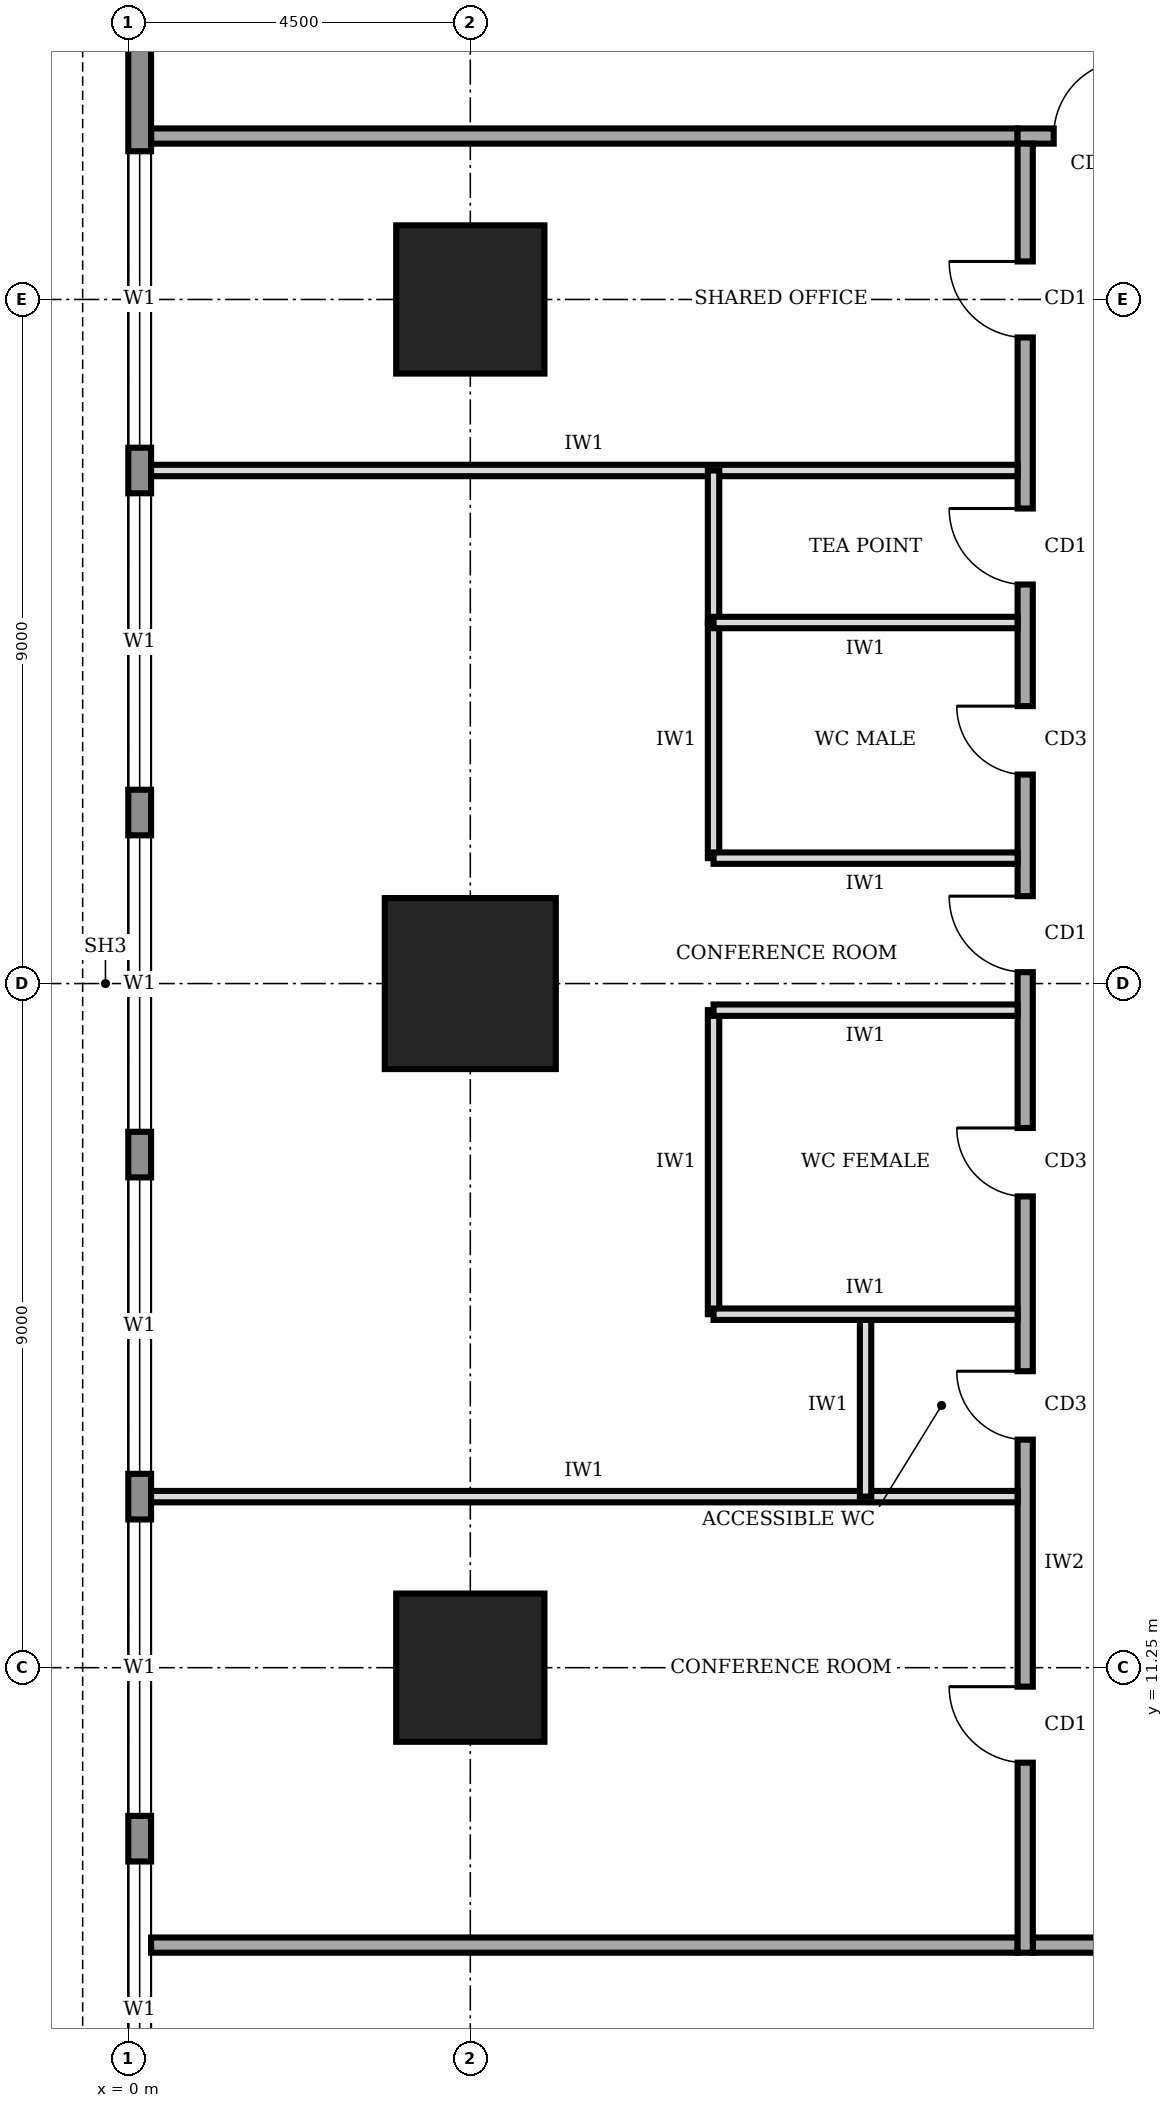
"""IFC4 building model, lengths in metres.
Left out: names, types, materials, properties, quantities, classifications, styles, units other than length and angle.
Written with IfcOpenShell. Run it as: python <this file> out.ifc"""

import sys

from ifc_helpers import new_model, si_unit, direction, frame, frame_2d, origin, origin_2d, place, context, subcontext, project, spatial, rectangle, extrude, element, fill, save


model = new_model("IFC4")
c1 = context("Model", 3, precision=1e-05, world=origin(), true_north=direction((0.0, 1.0)))
c2 = subcontext(c1, "Body", "Model", "MODEL_VIEW")
j1 = project(units=[si_unit("LENGTHUNIT", "METRE"), si_unit("PLANEANGLEUNIT", "RADIAN")], contexts=[c1])
p1 = place(None, origin())
s1 = spatial("IfcSite", under=j1, at=p1, CompositionType="ELEMENT")
p2 = place(p1, origin())
s2 = spatial("IfcBuilding", under=s1, at=p2, CompositionType="ELEMENT")
p3 = place(p2, frame((0.0, 0.0, 209.0)))
s3 = spatial("IfcBuildingStorey", under=s2, at=p3, CompositionType="ELEMENT", Elevation=209.0)
p4 = place(p3, frame((4.5, 11.25, 0.0), z_axis=(0.0, 0.0, 1.0), x_axis=(1.0, 0.0, 0.0)))
e1 = element("IfcColumn", 1, at=p4, inside=s3, PredefinedType="COLUMN", context=c2, shape_type="SweptSolid", body=[
    extrude(rectangle(XDim=1.95, YDim=1.95, at=origin_2d()), origin(), (0.0, 0.0, 1.0), 4.0),
])
p5 = place(p3, frame((4.5, 20.25, 0.0), z_axis=(0.0, 0.0, 1.0), x_axis=(1.0, 0.0, 0.0)))
e2 = element("IfcColumn", 2, at=p5, inside=s3, PredefinedType="COLUMN", context=c2, shape_type="SweptSolid", body=[
    extrude(rectangle(XDim=2.25, YDim=2.25, at=origin_2d()), origin(), (0.0, 0.0, 1.0), 4.0),
])
p6 = place(p3, frame((4.5, 29.25, 0.0), z_axis=(0.0, 0.0, 1.0), x_axis=(1.0, 0.0, 0.0)))
e3 = element("IfcColumn", 3, at=p6, inside=s3, PredefinedType="COLUMN", context=c2, shape_type="SweptSolid", body=[
    extrude(rectangle(XDim=1.95, YDim=1.95, at=origin_2d()), origin(), (0.0, 0.0, 1.0), 4.0),
])
p7 = place(p3, frame((0.15, 35.98, 0.0), z_axis=(0.0, 0.0, 1.0), x_axis=(0.0, -1.0, 0.0)))
e4 = element("IfcWall", 4, at=p7, inside=s3, PredefinedType="STANDARD", context=c2, shape_type="SweptSolid", body=[
    extrude(rectangle(XDim=31.46, YDim=0.3, at=frame_2d((15.73, 0.0))), origin(), (0.0, 0.0, 1.0), 3.75),
])
p8 = place(p7, frame((27.28, 0.0, 0.9)))
e5 = element("IfcOpeningElement", 5, at=p8, cuts=e4, PredefinedType="OPENING", context=c2, shape_type="SweptSolid", body=[
    extrude(rectangle(XDim=3.9, YDim=2.2, at=frame_2d((1.95, 1.1))), frame((0.0, 0.16, 0.0), z_axis=(0.0, -1.0, 0.0), x_axis=(1.0, 0.0, 0.0)), (0.0, 0.0, 1.0), 0.32),
])
p9 = place(p7, frame((22.78, 0.0, 0.9)))
e6 = element("IfcOpeningElement", 6, at=p9, cuts=e4, PredefinedType="OPENING", context=c2, shape_type="SweptSolid", body=[
    extrude(rectangle(XDim=3.9, YDim=2.2, at=frame_2d((1.95, 1.1))), frame((0.0, 0.16, 0.0), z_axis=(0.0, -1.0, 0.0), x_axis=(1.0, 0.0, 0.0)), (0.0, 0.0, 1.0), 0.32),
])
p10 = place(p7, frame((18.28, 0.0, 0.9)))
e7 = element("IfcOpeningElement", 7, at=p10, cuts=e4, PredefinedType="OPENING", context=c2, shape_type="SweptSolid", body=[
    extrude(rectangle(XDim=3.9, YDim=2.2, at=frame_2d((1.95, 1.1))), frame((0.0, 0.16, 0.0), z_axis=(0.0, -1.0, 0.0), x_axis=(1.0, 0.0, 0.0)), (0.0, 0.0, 1.0), 0.32),
])
p11 = place(p7, frame((13.78, 0.0, 0.9)))
e8 = element("IfcOpeningElement", 8, at=p11, cuts=e4, PredefinedType="OPENING", context=c2, shape_type="SweptSolid", body=[
    extrude(rectangle(XDim=3.9, YDim=2.2, at=frame_2d((1.95, 1.1))), frame((0.0, 0.16, 0.0), z_axis=(0.0, -1.0, 0.0), x_axis=(1.0, 0.0, 0.0)), (0.0, 0.0, 1.0), 0.32),
])
p12 = place(p7, frame((9.28, 0.0, 0.9)))
e9 = element("IfcOpeningElement", 9, at=p12, cuts=e4, PredefinedType="OPENING", context=c2, shape_type="SweptSolid", body=[
    extrude(rectangle(XDim=3.9, YDim=2.2, at=frame_2d((1.95, 1.1))), frame((0.0, 0.16, 0.0), z_axis=(0.0, -1.0, 0.0), x_axis=(1.0, 0.0, 0.0)), (0.0, 0.0, 1.0), 0.32),
])
p13 = place(p7, frame((4.78, 0.0, 0.9)))
e10 = element("IfcOpeningElement", 10, at=p13, cuts=e4, PredefinedType="OPENING", context=c2, shape_type="SweptSolid", body=[
    extrude(rectangle(XDim=3.9, YDim=2.2, at=frame_2d((1.95, 1.1))), frame((0.0, 0.16, 0.0), z_axis=(0.0, -1.0, 0.0), x_axis=(1.0, 0.0, 0.0)), (0.0, 0.0, 1.0), 0.32),
])
p14 = place(p3, frame((11.9, 7.6, 0.0), z_axis=(0.0, 0.0, 1.0), x_axis=(1.0, 0.0, 0.0)))
e11 = element("IfcWall", 11, at=p14, inside=s3, PredefinedType="SOLIDWALL", context=c2, shape_type="SweptSolid", body=[
    extrude(rectangle(XDim=16.9, YDim=0.2, at=frame_2d((8.45, 0.0))), origin(), (0.0, 0.0, 1.0), 3.75),
])
p15 = place(p3, frame((28.6, 31.4, 0.0), z_axis=(0.0, 0.0, 1.0), x_axis=(-1.0, 0.0, 0.0)))
e12 = element("IfcWall", 12, at=p15, inside=s3, PredefinedType="SOLIDWALL", context=c2, shape_type="SweptSolid", body=[
    extrude(rectangle(XDim=16.9, YDim=0.2, at=frame_2d((8.45, 0.0))), origin(), (0.0, 0.0, 1.0), 3.75),
])
p16 = place(p15, frame((15.425, 0.0, 0.0)))
e13 = element("IfcOpeningElement", 13, at=p16, cuts=e12, PredefinedType="OPENING", context=c2, shape_type="SweptSolid", body=[
    extrude(rectangle(XDim=1.0, YDim=2.1, at=frame_2d((0.5, 1.05))), frame((0.0, 0.11, 0.0), z_axis=(0.0, -1.0, 0.0), x_axis=(1.0, 0.0, 0.0)), (0.0, 0.0, 1.0), 0.22),
])
p17 = place(p15, frame((12.35, 0.0, 0.0)))
e14 = element("IfcOpeningElement", 14, at=p17, cuts=e12, PredefinedType="OPENING", context=c2, shape_type="SweptSolid", body=[
    extrude(rectangle(XDim=1.0, YDim=2.1, at=frame_2d((0.5, 1.05))), frame((0.0, 0.11, 0.0), z_axis=(0.0, -1.0, 0.0), x_axis=(1.0, 0.0, 0.0)), (0.0, 0.0, 1.0), 0.22),
])
p18 = place(p15, frame((5.6, 0.0, 0.0)))
e15 = element("IfcOpeningElement", 15, at=p18, cuts=e12, PredefinedType="OPENING", context=c2, shape_type="SweptSolid", body=[
    extrude(rectangle(XDim=1.0, YDim=2.1, at=frame_2d((0.5, 1.05))), frame((0.0, 0.11, 0.0), z_axis=(0.0, -1.0, 0.0), x_axis=(1.0, 0.0, 0.0)), (0.0, 0.0, 1.0), 0.22),
])
p19 = place(p15, frame((0.275, 0.0, 0.0)))
e16 = element("IfcOpeningElement", 16, at=p19, cuts=e12, PredefinedType="OPENING", context=c2, shape_type="SweptSolid", body=[
    extrude(rectangle(XDim=1.0, YDim=2.1, at=frame_2d((0.5, 1.05))), frame((0.0, 0.11, 0.0), z_axis=(0.0, -1.0, 0.0), x_axis=(1.0, 0.0, 0.0)), (0.0, 0.0, 1.0), 0.22),
])
p20 = place(p3, frame((11.8, 31.3, 0.0), z_axis=(0.0, 0.0, 1.0), x_axis=(0.0, -1.0, 0.0)))
e17 = element("IfcWall", 17, at=p20, inside=s3, PredefinedType="SOLIDWALL", context=c2, shape_type="SweptSolid", body=[
    extrude(rectangle(XDim=23.8, YDim=0.2, at=frame_2d((11.9, 0.0))), origin(), (0.0, 0.0, 1.0), 3.75),
])
p21 = place(p20, frame((20.3, 0.0, 0.0)))
e18 = element("IfcOpeningElement", 18, at=p21, cuts=e17, PredefinedType="OPENING", context=c2, shape_type="SweptSolid", body=[
    extrude(rectangle(XDim=1.0, YDim=2.1, at=frame_2d((0.5, 1.05))), frame((0.0, 0.11, 0.0), z_axis=(0.0, -1.0, 0.0), x_axis=(1.0, 0.0, 0.0)), (0.0, 0.0, 1.0), 0.22),
])
p22 = place(p20, frame((16.15, 0.0, 0.0)))
e19 = element("IfcOpeningElement", 19, at=p22, cuts=e17, PredefinedType="OPENING", context=c2, shape_type="SweptSolid", body=[
    extrude(rectangle(XDim=0.9, YDim=2.1, at=frame_2d((0.45, 1.05))), frame((0.0, 0.11, 0.0), z_axis=(0.0, -1.0, 0.0), x_axis=(1.0, 0.0, 0.0)), (0.0, 0.0, 1.0), 0.22),
])
p23 = place(p20, frame((12.95, 0.0, 0.0)))
e20 = element("IfcOpeningElement", 20, at=p23, cuts=e17, PredefinedType="OPENING", context=c2, shape_type="SweptSolid", body=[
    extrude(rectangle(XDim=0.9, YDim=2.1, at=frame_2d((0.45, 1.05))), frame((0.0, 0.11, 0.0), z_axis=(0.0, -1.0, 0.0), x_axis=(1.0, 0.0, 0.0)), (0.0, 0.0, 1.0), 0.22),
])
p24 = place(p20, frame((7.4, 0.0, 0.0)))
e21 = element("IfcOpeningElement", 21, at=p24, cuts=e17, PredefinedType="OPENING", context=c2, shape_type="SweptSolid", body=[
    extrude(rectangle(XDim=0.9, YDim=2.1, at=frame_2d((0.45, 1.05))), frame((0.0, 0.11, 0.0), z_axis=(0.0, -1.0, 0.0), x_axis=(1.0, 0.0, 0.0)), (0.0, 0.0, 1.0), 0.22),
])
p25 = place(p20, frame((4.8, 0.0, 0.0)))
e22 = element("IfcOpeningElement", 22, at=p25, cuts=e17, PredefinedType="OPENING", context=c2, shape_type="SweptSolid", body=[
    extrude(rectangle(XDim=1.0, YDim=2.1, at=frame_2d((0.5, 1.05))), frame((0.0, 0.11, 0.0), z_axis=(0.0, -1.0, 0.0), x_axis=(1.0, 0.0, 0.0)), (0.0, 0.0, 1.0), 0.22),
])
p26 = place(p20, frame((9.9, 0.0, 0.0)))
e23 = element("IfcOpeningElement", 23, at=p26, cuts=e17, PredefinedType="OPENING", context=c2, shape_type="SweptSolid", body=[
    extrude(rectangle(XDim=1.0, YDim=2.1, at=frame_2d((0.5, 1.05))), frame((0.0, 0.11, 0.0), z_axis=(0.0, -1.0, 0.0), x_axis=(1.0, 0.0, 0.0)), (0.0, 0.0, 1.0), 0.22),
])
p27 = place(p20, frame((1.55, 0.0, 0.0)))
e24 = element("IfcOpeningElement", 24, at=p27, cuts=e17, PredefinedType="OPENING", context=c2, shape_type="SweptSolid", body=[
    extrude(rectangle(XDim=1.0, YDim=2.1, at=frame_2d((0.5, 1.05))), frame((0.0, 0.11, 0.0), z_axis=(0.0, -1.0, 0.0), x_axis=(1.0, 0.0, 0.0)), (0.0, 0.0, 1.0), 0.22),
])
for number, where, z_axis, x_axis in (
    (25, (0.3, 7.6, 0.0), (0.0, 0.0, 1.0), (1.0, 0.0, 0.0)),
    (26, (0.3, 31.4, 0.0), (0.0, 0.0, 1.0), (1.0, 0.0, 0.0)),
):
    element("IfcWall", number, at=place(p3, frame(where, z_axis=z_axis, x_axis=x_axis)), inside=s3, PredefinedType="SOLIDWALL", context=c2, shape_type="SweptSolid", body=[
        extrude(rectangle(XDim=11.4, YDim=0.2, at=frame_2d((5.7, 0.0))), origin(), (0.0, 0.0, 1.0), 3.75),
    ])
for number, where, z_axis, x_axis in (
    (27, (0.3, 13.5, 0.0), (0.0, 0.0, 1.0), (1.0, 0.0, 0.0)),
    (28, (0.3, 27.0, 0.0), (0.0, 0.0, 1.0), (1.0, 0.0, 0.0)),
):
    element("IfcWall", number, at=place(p3, frame(where, z_axis=z_axis, x_axis=x_axis)), inside=s3, PredefinedType="PARTITIONING", context=c2, shape_type="SweptSolid", body=[
        extrude(rectangle(XDim=11.4, YDim=0.15, at=frame_2d((5.7, 0.0))), origin(), (0.0, 0.0, 1.0), 3.75),
    ])
p28 = place(p3, frame((11.7, 15.9, 0.0), z_axis=(0.0, 0.0, 1.0), x_axis=(-1.0, 0.0, 0.0)))
e29 = element("IfcWall", 29, at=p28, inside=s3, PredefinedType="PARTITIONING", context=c2, shape_type="SweptSolid", body=[
    extrude(rectangle(XDim=4.0, YDim=0.15, at=frame_2d((2.0, 0.0))), origin(), (0.0, 0.0, 1.0), 3.75),
])
p29 = place(p3, frame((11.7, 19.9, 0.0), z_axis=(0.0, 0.0, 1.0), x_axis=(-1.0, 0.0, 0.0)))
e30 = element("IfcWall", 30, at=p29, inside=s3, PredefinedType="PARTITIONING", context=c2, shape_type="SweptSolid", body=[
    extrude(rectangle(XDim=4.0, YDim=0.15, at=frame_2d((2.0, 0.0))), origin(), (0.0, 0.0, 1.0), 2.85),
])
for number, where, z_axis, x_axis in (
    (31, (11.7, 21.9, 0.0), (0.0, 0.0, 1.0), (-1.0, 0.0, 0.0)),
    (32, (11.7, 25.0, 0.0), (0.0, 0.0, 1.0), (-1.0, 0.0, 0.0)),
):
    element("IfcWall", number, at=place(p3, frame(where, z_axis=z_axis, x_axis=x_axis)), inside=s3, PredefinedType="PARTITIONING", context=c2, shape_type="SweptSolid", body=[
        extrude(rectangle(XDim=4.0, YDim=0.15, at=frame_2d((2.0, 0.0))), origin(), (0.0, 0.0, 1.0), 3.75),
    ])
p30 = place(p3, frame((9.7, 13.5, 0.0), z_axis=(0.0, 0.0, 1.0), x_axis=(0.0, 1.0, 0.0)))
e33 = element("IfcWall", 33, at=p30, inside=s3, PredefinedType="PARTITIONING", context=c2, shape_type="SweptSolid", body=[
    extrude(rectangle(XDim=2.4, YDim=0.15, at=frame_2d((1.2, 0.0))), origin(), (0.0, 0.0, 1.0), 3.75),
])
p31 = place(p3, frame((7.7, 15.9, 0.0), z_axis=(0.0, 0.0, 1.0), x_axis=(0.0, 1.0, 0.0)))
e34 = element("IfcWall", 34, at=p31, inside=s3, PredefinedType="PARTITIONING", context=c2, shape_type="SweptSolid", body=[
    extrude(rectangle(XDim=4.0, YDim=0.15, at=frame_2d((2.0, 0.0))), origin(), (0.0, 0.0, 1.0), 3.75),
])
p32 = place(p3, frame((7.7, 21.9, 0.0), z_axis=(0.0, 0.0, 1.0), x_axis=(0.0, 1.0, 0.0)))
e35 = element("IfcWall", 35, at=p32, inside=s3, PredefinedType="PARTITIONING", context=c2, shape_type="SweptSolid", body=[
    extrude(rectangle(XDim=3.1, YDim=0.15, at=frame_2d((1.55, 0.0))), origin(), (0.0, 0.0, 1.0), 3.75),
])
p33 = place(p3, frame((7.7, 25.0, 0.0), z_axis=(0.0, 0.0, 1.0), x_axis=(0.0, 1.0, 0.0)))
e36 = element("IfcWall", 36, at=p33, inside=s3, PredefinedType="PARTITIONING", context=c2, shape_type="SweptSolid", body=[
    extrude(rectangle(XDim=2.0, YDim=0.15, at=frame_2d((1.0, 0.0))), origin(), (0.0, 0.0, 1.0), 3.75),
])
p34 = place(p8, origin())
e37 = element("IfcWindow", 37, at=p34, inside=s3, PartitioningType="SINGLE_PANEL", PredefinedType="WINDOW", context=c2, shape_type="SweptSolid", body=[
    extrude(rectangle(XDim=3.9, YDim=2.2, at=frame_2d((1.95, 1.1))), frame((0.0, 0.03, 0.0), z_axis=(0.0, -1.0, 0.0), x_axis=(1.0, 0.0, 0.0)), (0.0, 0.0, 1.0), 0.06),
])
fill(e5, e37)
p35 = place(p9, origin())
e38 = element("IfcWindow", 38, at=p35, inside=s3, PartitioningType="SINGLE_PANEL", PredefinedType="WINDOW", context=c2, shape_type="SweptSolid", body=[
    extrude(rectangle(XDim=3.9, YDim=2.2, at=frame_2d((1.95, 1.1))), frame((0.0, 0.03, 0.0), z_axis=(0.0, -1.0, 0.0), x_axis=(1.0, 0.0, 0.0)), (0.0, 0.0, 1.0), 0.06),
])
fill(e6, e38)
p36 = place(p10, origin())
e39 = element("IfcWindow", 39, at=p36, inside=s3, PartitioningType="SINGLE_PANEL", PredefinedType="WINDOW", context=c2, shape_type="SweptSolid", body=[
    extrude(rectangle(XDim=3.9, YDim=2.2, at=frame_2d((1.95, 1.1))), frame((0.0, 0.03, 0.0), z_axis=(0.0, -1.0, 0.0), x_axis=(1.0, 0.0, 0.0)), (0.0, 0.0, 1.0), 0.06),
])
fill(e7, e39)
p37 = place(p11, origin())
e40 = element("IfcWindow", 40, at=p37, inside=s3, PartitioningType="SINGLE_PANEL", PredefinedType="WINDOW", context=c2, shape_type="SweptSolid", body=[
    extrude(rectangle(XDim=3.9, YDim=2.2, at=frame_2d((1.95, 1.1))), frame((0.0, 0.03, 0.0), z_axis=(0.0, -1.0, 0.0), x_axis=(1.0, 0.0, 0.0)), (0.0, 0.0, 1.0), 0.06),
])
fill(e8, e40)
p38 = place(p12, origin())
e41 = element("IfcWindow", 41, at=p38, inside=s3, PartitioningType="SINGLE_PANEL", PredefinedType="WINDOW", context=c2, shape_type="SweptSolid", body=[
    extrude(rectangle(XDim=3.9, YDim=2.2, at=frame_2d((1.95, 1.1))), frame((0.0, 0.03, 0.0), z_axis=(0.0, -1.0, 0.0), x_axis=(1.0, 0.0, 0.0)), (0.0, 0.0, 1.0), 0.06),
])
fill(e9, e41)
p39 = place(p13, origin())
e42 = element("IfcWindow", 42, at=p39, inside=s3, PartitioningType="SINGLE_PANEL", PredefinedType="WINDOW", context=c2, shape_type="SweptSolid", body=[
    extrude(rectangle(XDim=3.9, YDim=2.2, at=frame_2d((1.95, 1.1))), frame((0.0, 0.03, 0.0), z_axis=(0.0, -1.0, 0.0), x_axis=(1.0, 0.0, 0.0)), (0.0, 0.0, 1.0), 0.06),
])
fill(e10, e42)
p40 = place(p16, frame((1.0, 0.0, 0.0), z_axis=(0.0, 0.0, 1.0), x_axis=(-1.0, 0.0, 0.0)))
e43 = element("IfcDoor", 43, at=p40, inside=s3, OperationType="SINGLE_SWING_RIGHT", PredefinedType="DOOR", context=c2, shape_type="SweptSolid", body=[
    extrude(rectangle(XDim=1.0, YDim=2.1, at=frame_2d((0.5, 1.05))), frame((0.0, 0.025, 0.0), z_axis=(0.0, -1.0, 0.0), x_axis=(1.0, 0.0, 0.0)), (0.0, 0.0, 1.0), 0.05),
])
fill(e13, e43)
p41 = place(p21, frame((1.0, 0.0, 0.0), z_axis=(0.0, 0.0, 1.0), x_axis=(-1.0, 0.0, 0.0)))
e44 = element("IfcDoor", 44, at=p41, inside=s3, OperationType="SINGLE_SWING_RIGHT", PredefinedType="DOOR", context=c2, shape_type="SweptSolid", body=[
    extrude(rectangle(XDim=1.0, YDim=2.1, at=frame_2d((0.5, 1.05))), frame((0.0, 0.025, 0.0), z_axis=(0.0, -1.0, 0.0), x_axis=(1.0, 0.0, 0.0)), (0.0, 0.0, 1.0), 0.05),
])
fill(e18, e44)
p42 = place(p22, frame((0.9, 0.0, 0.0), z_axis=(0.0, 0.0, 1.0), x_axis=(-1.0, 0.0, 0.0)))
e45 = element("IfcDoor", 45, at=p42, inside=s3, OperationType="SINGLE_SWING_RIGHT", PredefinedType="DOOR", context=c2, shape_type="SweptSolid", body=[
    extrude(rectangle(XDim=0.9, YDim=2.1, at=frame_2d((0.45, 1.05))), frame((0.0, 0.025, 0.0), z_axis=(0.0, -1.0, 0.0), x_axis=(1.0, 0.0, 0.0)), (0.0, 0.0, 1.0), 0.05),
])
fill(e19, e45)
p43 = place(p23, frame((0.9, 0.0, 0.0), z_axis=(0.0, 0.0, 1.0), x_axis=(-1.0, 0.0, 0.0)))
e46 = element("IfcDoor", 46, at=p43, inside=s3, OperationType="SINGLE_SWING_RIGHT", PredefinedType="DOOR", context=c2, shape_type="SweptSolid", body=[
    extrude(rectangle(XDim=0.9, YDim=2.1, at=frame_2d((0.45, 1.05))), frame((0.0, 0.025, 0.0), z_axis=(0.0, -1.0, 0.0), x_axis=(1.0, 0.0, 0.0)), (0.0, 0.0, 1.0), 0.05),
])
fill(e20, e46)
p44 = place(p24, frame((0.9, 0.0, 0.0), z_axis=(0.0, 0.0, 1.0), x_axis=(-1.0, 0.0, 0.0)))
e47 = element("IfcDoor", 47, at=p44, inside=s3, OperationType="SINGLE_SWING_RIGHT", PredefinedType="DOOR", context=c2, shape_type="SweptSolid", body=[
    extrude(rectangle(XDim=0.9, YDim=2.1, at=frame_2d((0.45, 1.05))), frame((0.0, 0.025, 0.0), z_axis=(0.0, -1.0, 0.0), x_axis=(1.0, 0.0, 0.0)), (0.0, 0.0, 1.0), 0.05),
])
fill(e21, e47)
p45 = place(p25, frame((1.0, 0.0, 0.0), z_axis=(0.0, 0.0, 1.0), x_axis=(-1.0, 0.0, 0.0)))
e48 = element("IfcDoor", 48, at=p45, inside=s3, OperationType="SINGLE_SWING_RIGHT", PredefinedType="DOOR", context=c2, shape_type="SweptSolid", body=[
    extrude(rectangle(XDim=1.0, YDim=2.1, at=frame_2d((0.5, 1.05))), frame((0.0, 0.025, 0.0), z_axis=(0.0, -1.0, 0.0), x_axis=(1.0, 0.0, 0.0)), (0.0, 0.0, 1.0), 0.05),
])
fill(e22, e48)
p46 = place(p26, frame((1.0, 0.0, 0.0), z_axis=(0.0, 0.0, 1.0), x_axis=(-1.0, 0.0, 0.0)))
e49 = element("IfcDoor", 49, at=p46, inside=s3, OperationType="SINGLE_SWING_RIGHT", PredefinedType="DOOR", context=c2, shape_type="SweptSolid", body=[
    extrude(rectangle(XDim=1.0, YDim=2.1, at=frame_2d((0.5, 1.05))), frame((0.0, 0.025, 0.0), z_axis=(0.0, -1.0, 0.0), x_axis=(1.0, 0.0, 0.0)), (0.0, 0.0, 1.0), 0.05),
])
fill(e23, e49)
p47 = place(p27, frame((1.0, 0.0, 0.0), z_axis=(0.0, 0.0, 1.0), x_axis=(-1.0, 0.0, 0.0)))
e50 = element("IfcDoor", 50, at=p47, inside=s3, OperationType="SINGLE_SWING_RIGHT", PredefinedType="DOOR", context=c2, shape_type="SweptSolid", body=[
    extrude(rectangle(XDim=1.0, YDim=2.1, at=frame_2d((0.5, 1.05))), frame((0.0, 0.025, 0.0), z_axis=(0.0, -1.0, 0.0), x_axis=(1.0, 0.0, 0.0)), (0.0, 0.0, 1.0), 0.05),
])
fill(e24, e50)
save(model, sys.argv[1])
